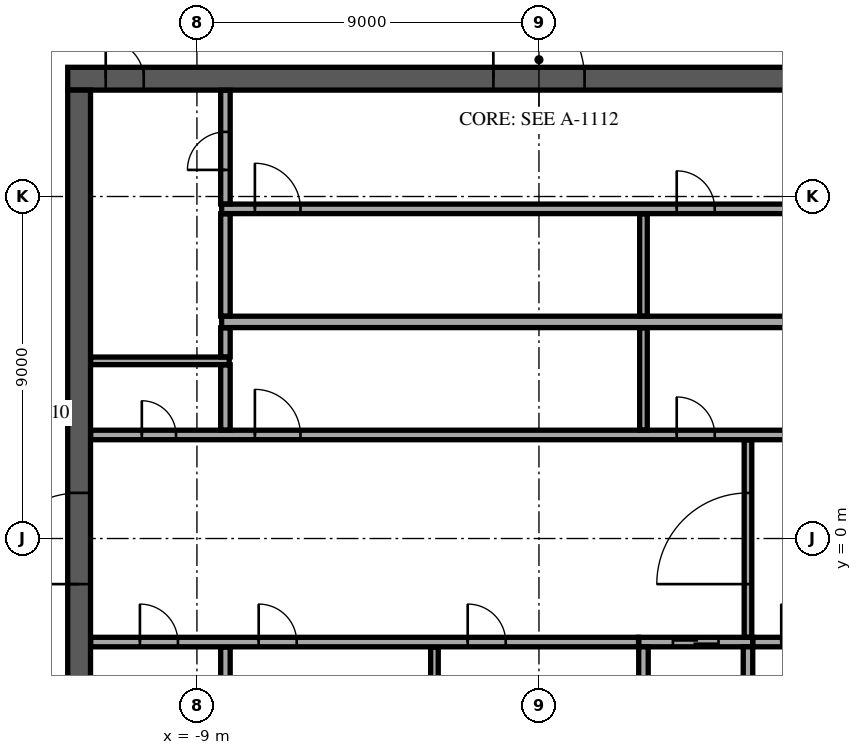
"""IFC4 building model, lengths in metres.
Left out: names, types, materials, properties, quantities, classifications, styles, units other than length and angle.
Written with IfcOpenShell. Run it as: python <this file> out.ifc"""

import sys

from ifc_helpers import new_model, si_unit, direction, frame, frame_2d, origin, place, context, subcontext, project, spatial, rectangle, extrude, element, fill, save


model = new_model("IFC4")
c1 = context("Model", 3, precision=1e-05, world=origin(), true_north=direction((0.0, 1.0)))
c2 = subcontext(c1, "Body", "Model", "MODEL_VIEW")
j1 = project(units=[si_unit("LENGTHUNIT", "METRE"), si_unit("PLANEANGLEUNIT", "RADIAN")], contexts=[c1])
p1 = place(None, origin())
s1 = spatial("IfcSite", under=j1, at=p1, CompositionType="ELEMENT")
p2 = place(p1, origin())
s2 = spatial("IfcBuilding", under=s1, at=p2, CompositionType="ELEMENT")
p3 = place(p2, frame((0.0, 0.0, 368.1)))
s3 = spatial("IfcBuildingStorey", under=s2, at=p3, CompositionType="ELEMENT", Elevation=368.1)
p4 = place(p3, frame((-12.4, 12.1, 0.0), z_axis=(0.0, 0.0, 1.0), x_axis=(1.0, 0.0, 0.0)))
e1 = element("IfcWall", 1, at=p4, inside=s3, PredefinedType="SHEAR", context=c2, shape_type="SweptSolid", body=[
    extrude(rectangle(XDim=24.8, YDim=0.6, at=frame_2d((12.4, 0.0))), origin(), (0.0, 0.0, 1.0), 4.7),
])
p5 = place(p4, frame((11.2, 0.0, 0.0)))
e2 = element("IfcOpeningElement", 2, at=p5, cuts=e1, PredefinedType="OPENING", context=c2, shape_type="SweptSolid", body=[
    extrude(rectangle(XDim=2.4, YDim=2.4, at=frame_2d((1.2, 1.2))), frame((0.0, 0.31, 0.0), z_axis=(0.0, -1.0, 0.0), x_axis=(1.0, 0.0, 0.0)), (0.0, 0.0, 1.0), 0.62),
])
p6 = place(p4, frame((22.025, 0.0, 0.0)))
e3 = element("IfcOpeningElement", 3, at=p6, cuts=e1, PredefinedType="OPENING", context=c2, shape_type="SweptSolid", body=[
    extrude(rectangle(XDim=1.2, YDim=2.1, at=frame_2d((0.6, 1.05))), frame((0.0, 0.31, 0.0), z_axis=(0.0, -1.0, 0.0), x_axis=(1.0, 0.0, 0.0)), (0.0, 0.0, 1.0), 0.62),
])
p7 = place(p4, frame((1.0, 0.0, 0.0)))
e4 = element("IfcOpeningElement", 4, at=p7, cuts=e1, PredefinedType="OPENING", context=c2, shape_type="SweptSolid", body=[
    extrude(rectangle(XDim=1.0, YDim=2.1, at=frame_2d((0.5, 1.05))), frame((0.0, 0.31, 0.0), z_axis=(0.0, -1.0, 0.0), x_axis=(1.0, 0.0, 0.0)), (0.0, 0.0, 1.0), 0.62),
])
p8 = place(p3, frame((-12.1, -11.8, 0.0), z_axis=(0.0, 0.0, 1.0), x_axis=(0.0, 1.0, 0.0)))
e5 = element("IfcWall", 5, at=p8, inside=s3, PredefinedType="SHEAR", context=c2, shape_type="SweptSolid", body=[
    extrude(rectangle(XDim=23.6, YDim=0.6, at=frame_2d((11.8, 0.0))), origin(), (0.0, 0.0, 1.0), 4.7),
])
p9 = place(p8, frame((10.6, 0.0, 0.0)))
e6 = element("IfcOpeningElement", 6, at=p9, cuts=e5, PredefinedType="OPENING", context=c2, shape_type="SweptSolid", body=[
    extrude(rectangle(XDim=2.4, YDim=2.4, at=frame_2d((1.2, 1.2))), frame((0.0, 0.31, 0.0), z_axis=(0.0, -1.0, 0.0), x_axis=(1.0, 0.0, 0.0)), (0.0, 0.0, 1.0), 0.62),
])
p10 = place(p3, frame((2.625, -2.725, 0.0), z_axis=(0.0, 0.0, 1.0), x_axis=(1.0, 0.0, 0.0)))
e7 = element("IfcWall", 7, at=p10, inside=s3, PredefinedType="SOLIDWALL", context=c2, shape_type="SweptSolid", body=[
    extrude(rectangle(XDim=3.0, YDim=0.25, at=frame_2d((1.5, 0.0))), origin(), (0.0, 0.0, 1.0), 4.7),
])
p11 = place(p10, frame((0.9, 0.0, 0.0)))
e8 = element("IfcOpeningElement", 8, at=p11, cuts=e7, PredefinedType="OPENING", context=c2, shape_type="SweptSolid", body=[
    extrude(rectangle(XDim=1.2, YDim=2.1, at=frame_2d((0.6, 1.05))), frame((0.0, 0.135, 0.0), z_axis=(0.0, -1.0, 0.0), x_axis=(1.0, 0.0, 0.0)), (0.0, 0.0, 1.0), 0.27),
])
for number, where, z_axis, x_axis in (
    (9, (2.75, -5.55, 0.0), (0.0, 0.0, 1.0), (0.0, 1.0, 0.0)),
    (10, (5.5, -5.55, 0.0), (0.0, 0.0, 1.0), (0.0, 1.0, 0.0)),
):
    element("IfcWall", number, at=place(p3, frame(where, z_axis=z_axis, x_axis=x_axis)), inside=s3, PredefinedType="SOLIDWALL", context=c2, shape_type="SweptSolid", body=[
        extrude(rectangle(XDim=2.7, YDim=0.25, at=frame_2d((1.35, 0.0))), origin(), (0.0, 0.0, 1.0), 4.7),
    ])
p12 = place(p3, frame((-8.25, -5.545, 0.0), z_axis=(0.0, 0.0, 1.0), x_axis=(0.0, 1.0, 0.0)))
e11 = element("IfcWall", 11, at=p12, inside=s3, PredefinedType="PARTITIONING", context=c2, shape_type="SweptSolid", body=[
    extrude(rectangle(XDim=2.69, YDim=0.25, at=frame_2d((1.345, 0.0))), origin(), (0.0, 0.0, 1.0), 4.7),
])
p13 = place(p3, frame((-2.75, -5.545, 0.0), z_axis=(0.0, 0.0, 1.0), x_axis=(0.0, 1.0, 0.0)))
e12 = element("IfcWall", 12, at=p13, inside=s3, PredefinedType="PARTITIONING", context=c2, shape_type="SweptSolid", body=[
    extrude(rectangle(XDim=2.69, YDim=0.2, at=frame_2d((1.345, 0.0))), origin(), (0.0, 0.0, 1.0), 4.7),
])
p14 = place(p3, frame((-11.795, -2.725, 0.0), z_axis=(0.0, 0.0, 1.0), x_axis=(1.0, 0.0, 0.0)))
e13 = element("IfcWall", 13, at=p14, inside=s3, PredefinedType="PARTITIONING", context=c2, shape_type="SweptSolid", body=[
    extrude(rectangle(XDim=14.415, YDim=0.25, at=frame_2d((7.208, 0.0))), origin(), (0.0, 0.0, 1.0), 4.7),
])
p15 = place(p14, frame((1.295, 0.0, 0.0)))
e14 = element("IfcOpeningElement", 14, at=p15, cuts=e13, PredefinedType="OPENING", context=c2, shape_type="SweptSolid", body=[
    extrude(rectangle(XDim=1.0, YDim=2.1, at=frame_2d((0.5, 1.05))), frame((0.0, 0.135, 0.0), z_axis=(0.0, -1.0, 0.0), x_axis=(1.0, 0.0, 0.0)), (0.0, 0.0, 1.0), 0.27),
])
p16 = place(p14, frame((4.42, 0.0, 0.0)))
e15 = element("IfcOpeningElement", 15, at=p16, cuts=e13, PredefinedType="OPENING", context=c2, shape_type="SweptSolid", body=[
    extrude(rectangle(XDim=1.0, YDim=2.1, at=frame_2d((0.5, 1.05))), frame((0.0, 0.135, 0.0), z_axis=(0.0, -1.0, 0.0), x_axis=(1.0, 0.0, 0.0)), (0.0, 0.0, 1.0), 0.27),
])
p17 = place(p14, frame((9.92, 0.0, 0.0)))
e16 = element("IfcOpeningElement", 16, at=p17, cuts=e13, PredefinedType="OPENING", context=c2, shape_type="SweptSolid", body=[
    extrude(rectangle(XDim=1.0, YDim=2.1, at=frame_2d((0.5, 1.05))), frame((0.0, 0.135, 0.0), z_axis=(0.0, -1.0, 0.0), x_axis=(1.0, 0.0, 0.0)), (0.0, 0.0, 1.0), 0.27),
])
p18 = place(p3, frame((5.63, -2.725, 0.0), z_axis=(0.0, 0.0, 1.0), x_axis=(1.0, 0.0, 0.0)))
e17 = element("IfcWall", 17, at=p18, inside=s3, PredefinedType="PARTITIONING", context=c2, shape_type="SweptSolid", body=[
    extrude(rectangle(XDim=6.165, YDim=0.25, at=frame_2d((3.083, 0.0))), origin(), (0.0, 0.0, 1.0), 4.7),
])
p19 = place(p18, frame((0.745, 0.0, 0.0)))
e18 = element("IfcOpeningElement", 18, at=p19, cuts=e17, PredefinedType="OPENING", context=c2, shape_type="SweptSolid", body=[
    extrude(rectangle(XDim=1.0, YDim=2.1, at=frame_2d((0.5, 1.05))), frame((0.0, 0.135, 0.0), z_axis=(0.0, -1.0, 0.0), x_axis=(1.0, 0.0, 0.0)), (0.0, 0.0, 1.0), 0.27),
])
p20 = place(p18, frame((3.92, 0.0, 0.0)))
e19 = element("IfcOpeningElement", 19, at=p20, cuts=e17, PredefinedType="OPENING", context=c2, shape_type="SweptSolid", body=[
    extrude(rectangle(XDim=0.9, YDim=2.1, at=frame_2d((0.45, 1.05))), frame((0.0, 0.135, 0.0), z_axis=(0.0, -1.0, 0.0), x_axis=(1.0, 0.0, 0.0)), (0.0, 0.0, 1.0), 0.27),
])
p21 = place(p3, frame((5.5, -2.595, 0.0), z_axis=(0.0, 0.0, 1.0), x_axis=(0.0, 1.0, 0.0)))
e20 = element("IfcWall", 20, at=p21, inside=s3, PredefinedType="PARTITIONING", context=c2, shape_type="SweptSolid", body=[
    extrude(rectangle(XDim=5.19, YDim=0.2, at=frame_2d((2.595, 0.0))), origin(), (0.0, 0.0, 1.0), 4.7),
])
p22 = place(p21, frame((1.395, 0.0, 0.0)))
e21 = element("IfcOpeningElement", 21, at=p22, cuts=e20, PredefinedType="OPENING", context=c2, shape_type="SweptSolid", body=[
    extrude(rectangle(XDim=2.4, YDim=2.4, at=frame_2d((1.2, 1.2))), frame((0.0, 0.11, 0.0), z_axis=(0.0, -1.0, 0.0), x_axis=(1.0, 0.0, 0.0)), (0.0, 0.0, 1.0), 0.22),
])
p23 = place(p3, frame((-11.795, 2.725, 0.0), z_axis=(0.0, 0.0, 1.0), x_axis=(1.0, 0.0, 0.0)))
e22 = element("IfcWall", 22, at=p23, inside=s3, PredefinedType="PARTITIONING", context=c2, shape_type="SweptSolid", body=[
    extrude(rectangle(XDim=23.59, YDim=0.25, at=frame_2d((11.795, 0.0))), origin(), (0.0, 0.0, 1.0), 4.7),
])
p24 = place(p23, frame((21.345, 0.0, 0.0)))
e23 = element("IfcOpeningElement", 23, at=p24, cuts=e22, PredefinedType="OPENING", context=c2, shape_type="SweptSolid", body=[
    extrude(rectangle(XDim=0.9, YDim=2.1, at=frame_2d((0.45, 1.05))), frame((0.0, 0.135, 0.0), z_axis=(0.0, -1.0, 0.0), x_axis=(1.0, 0.0, 0.0)), (0.0, 0.0, 1.0), 0.27),
])
p25 = place(p23, frame((1.345, 0.0, 0.0)))
e24 = element("IfcOpeningElement", 24, at=p25, cuts=e22, PredefinedType="OPENING", context=c2, shape_type="SweptSolid", body=[
    extrude(rectangle(XDim=0.9, YDim=2.1, at=frame_2d((0.45, 1.05))), frame((0.0, 0.135, 0.0), z_axis=(0.0, -1.0, 0.0), x_axis=(1.0, 0.0, 0.0)), (0.0, 0.0, 1.0), 0.27),
])
p26 = place(p23, frame((4.32, 0.0, 0.0)))
e25 = element("IfcOpeningElement", 25, at=p26, cuts=e22, PredefinedType="OPENING", context=c2, shape_type="SweptSolid", body=[
    extrude(rectangle(XDim=1.2, YDim=2.1, at=frame_2d((0.6, 1.05))), frame((0.0, 0.135, 0.0), z_axis=(0.0, -1.0, 0.0), x_axis=(1.0, 0.0, 0.0)), (0.0, 0.0, 1.0), 0.27),
])
p27 = place(p23, frame((15.42, 0.0, 0.0)))
e26 = element("IfcOpeningElement", 26, at=p27, cuts=e22, PredefinedType="OPENING", context=c2, shape_type="SweptSolid", body=[
    extrude(rectangle(XDim=1.0, YDim=2.1, at=frame_2d((0.5, 1.05))), frame((0.0, 0.135, 0.0), z_axis=(0.0, -1.0, 0.0), x_axis=(1.0, 0.0, 0.0)), (0.0, 0.0, 1.0), 0.27),
])
p28 = place(p3, frame((-8.25, 2.855, 0.0), z_axis=(0.0, 0.0, 1.0), x_axis=(0.0, 1.0, 0.0)))
e27 = element("IfcWall", 27, at=p28, inside=s3, PredefinedType="PARTITIONING", context=c2, shape_type="SweptSolid", body=[
    extrude(rectangle(XDim=1.715, YDim=0.25, at=frame_2d((0.857, 0.0))), origin(), (0.0, 0.0, 1.0), 4.7),
])
p29 = place(p3, frame((2.75, 2.855, 0.0), z_axis=(0.0, 0.0, 1.0), x_axis=(0.0, 1.0, 0.0)))
e28 = element("IfcWall", 28, at=p29, inside=s3, PredefinedType="PARTITIONING", context=c2, shape_type="SweptSolid", body=[
    extrude(rectangle(XDim=2.69, YDim=0.2, at=frame_2d((1.345, 0.0))), origin(), (0.0, 0.0, 1.0), 4.7),
])
p30 = place(p3, frame((-11.795, 4.675, 0.0), z_axis=(0.0, 0.0, 1.0), x_axis=(1.0, 0.0, 0.0)))
e29 = element("IfcWall", 29, at=p30, inside=s3, PredefinedType="PARTITIONING", context=c2, shape_type="SweptSolid", body=[
    extrude(rectangle(XDim=3.645, YDim=0.2, at=frame_2d((1.823, 0.0))), origin(), (0.0, 0.0, 1.0), 4.7),
])
p31 = place(p3, frame((-8.25, 4.78, 0.0), z_axis=(0.0, 0.0, 1.0), x_axis=(0.0, 1.0, 0.0)))
e30 = element("IfcWall", 30, at=p31, inside=s3, PredefinedType="PARTITIONING", context=c2, shape_type="SweptSolid", body=[
    extrude(rectangle(XDim=0.765, YDim=0.25, at=frame_2d((0.382, 0.0))), origin(), (0.0, 0.0, 1.0), 4.7),
])
p32 = place(p3, frame((-8.35, 5.7, 0.0), z_axis=(0.0, 0.0, 1.0), x_axis=(1.0, 0.0, 0.0)))
e31 = element("IfcWall", 31, at=p32, inside=s3, PredefinedType="PARTITIONING", context=c2, shape_type="SweptSolid", body=[
    extrude(rectangle(XDim=16.7, YDim=0.3, at=frame_2d((8.35, 0.0))), origin(), (0.0, 0.0, 1.0), 4.7),
])
p33 = place(p3, frame((-8.25, 5.855, 0.0), z_axis=(0.0, 0.0, 1.0), x_axis=(0.0, 1.0, 0.0)))
e32 = element("IfcWall", 32, at=p33, inside=s3, PredefinedType="PARTITIONING", context=c2, shape_type="SweptSolid", body=[
    extrude(rectangle(XDim=2.69, YDim=0.25, at=frame_2d((1.345, 0.0))), origin(), (0.0, 0.0, 1.0), 4.7),
])
p34 = place(p3, frame((2.75, 5.855, 0.0), z_axis=(0.0, 0.0, 1.0), x_axis=(0.0, 1.0, 0.0)))
e33 = element("IfcWall", 33, at=p34, inside=s3, PredefinedType="PARTITIONING", context=c2, shape_type="SweptSolid", body=[
    extrude(rectangle(XDim=2.69, YDim=0.2, at=frame_2d((1.345, 0.0))), origin(), (0.0, 0.0, 1.0), 4.7),
])
p35 = place(p3, frame((-8.35, 8.675, 0.0), z_axis=(0.0, 0.0, 1.0), x_axis=(1.0, 0.0, 0.0)))
e34 = element("IfcWall", 34, at=p35, inside=s3, PredefinedType="PARTITIONING", context=c2, shape_type="SweptSolid", body=[
    extrude(rectangle(XDim=16.72, YDim=0.25, at=frame_2d((8.36, 0.0))), origin(), (0.0, 0.0, 1.0), 4.7),
])
p36 = place(p35, frame((0.875, 0.0, 0.0)))
e35 = element("IfcOpeningElement", 35, at=p36, cuts=e34, PredefinedType="OPENING", context=c2, shape_type="SweptSolid", body=[
    extrude(rectangle(XDim=1.2, YDim=2.1, at=frame_2d((0.6, 1.05))), frame((0.0, 0.135, 0.0), z_axis=(0.0, -1.0, 0.0), x_axis=(1.0, 0.0, 0.0)), (0.0, 0.0, 1.0), 0.27),
])
p37 = place(p35, frame((11.975, 0.0, 0.0)))
e36 = element("IfcOpeningElement", 36, at=p37, cuts=e34, PredefinedType="OPENING", context=c2, shape_type="SweptSolid", body=[
    extrude(rectangle(XDim=1.0, YDim=2.1, at=frame_2d((0.5, 1.05))), frame((0.0, 0.135, 0.0), z_axis=(0.0, -1.0, 0.0), x_axis=(1.0, 0.0, 0.0)), (0.0, 0.0, 1.0), 0.27),
])
p38 = place(p3, frame((-8.25, 8.805, 0.0), z_axis=(0.0, 0.0, 1.0), x_axis=(0.0, 1.0, 0.0)))
e37 = element("IfcWall", 37, at=p38, inside=s3, PredefinedType="PARTITIONING", context=c2, shape_type="SweptSolid", body=[
    extrude(rectangle(XDim=2.99, YDim=0.25, at=frame_2d((1.495, 0.0))), origin(), (0.0, 0.0, 1.0), 4.7),
])
p39 = place(p38, frame((0.895, 0.0, 0.0)))
e38 = element("IfcOpeningElement", 38, at=p39, cuts=e37, PredefinedType="OPENING", context=c2, shape_type="SweptSolid", body=[
    extrude(rectangle(XDim=1.0, YDim=2.1, at=frame_2d((0.5, 1.05))), frame((0.0, 0.135, 0.0), z_axis=(0.0, -1.0, 0.0), x_axis=(1.0, 0.0, 0.0)), (0.0, 0.0, 1.0), 0.27),
])
p40 = place(p5, origin())
e39 = element("IfcDoor", 39, at=p40, inside=s3, OperationType="SINGLE_SWING_LEFT", PredefinedType="DOOR", context=c2, shape_type="SweptSolid", body=[
    extrude(rectangle(XDim=2.4, YDim=2.4, at=frame_2d((1.2, 1.2))), frame((0.0, 0.025, 0.0), z_axis=(0.0, -1.0, 0.0), x_axis=(1.0, 0.0, 0.0)), (0.0, 0.0, 1.0), 0.05),
])
fill(e2, e39)
p41 = place(p7, origin())
e40 = element("IfcDoor", 40, at=p41, inside=s3, OperationType="SINGLE_SWING_LEFT", PredefinedType="DOOR", context=c2, shape_type="SweptSolid", body=[
    extrude(rectangle(XDim=1.0, YDim=2.1, at=frame_2d((0.5, 1.05))), frame((0.0, 0.025, 0.0), z_axis=(0.0, -1.0, 0.0), x_axis=(1.0, 0.0, 0.0)), (0.0, 0.0, 1.0), 0.05),
])
fill(e4, e40)
p42 = place(p9, origin())
e41 = element("IfcDoor", 41, at=p42, inside=s3, OperationType="SINGLE_SWING_LEFT", PredefinedType="DOOR", context=c2, shape_type="SweptSolid", body=[
    extrude(rectangle(XDim=2.4, YDim=2.4, at=frame_2d((1.2, 1.2))), frame((0.0, 0.025, 0.0), z_axis=(0.0, -1.0, 0.0), x_axis=(1.0, 0.0, 0.0)), (0.0, 0.0, 1.0), 0.05),
])
fill(e6, e41)
p43 = place(p11, origin())
e42 = element("IfcDoor", 42, at=p43, inside=s3, OperationType="DOUBLE_DOOR_SLIDING", PredefinedType="DOOR", context=c2, shape_type="SweptSolid", body=[
    extrude(rectangle(XDim=1.2, YDim=2.1, at=frame_2d((0.6, 1.05))), frame((0.0, 0.025, 0.0), z_axis=(0.0, -1.0, 0.0), x_axis=(1.0, 0.0, 0.0)), (0.0, 0.0, 1.0), 0.05),
])
fill(e8, e42)
p44 = place(p15, origin())
e43 = element("IfcDoor", 43, at=p44, inside=s3, OperationType="SINGLE_SWING_LEFT", PredefinedType="DOOR", context=c2, shape_type="SweptSolid", body=[
    extrude(rectangle(XDim=1.0, YDim=2.1, at=frame_2d((0.5, 1.05))), frame((0.0, 0.025, 0.0), z_axis=(0.0, -1.0, 0.0), x_axis=(1.0, 0.0, 0.0)), (0.0, 0.0, 1.0), 0.05),
])
fill(e14, e43)
p45 = place(p19, origin())
e44 = element("IfcDoor", 44, at=p45, inside=s3, OperationType="SINGLE_SWING_LEFT", PredefinedType="DOOR", context=c2, shape_type="SweptSolid", body=[
    extrude(rectangle(XDim=1.0, YDim=2.1, at=frame_2d((0.5, 1.05))), frame((0.0, 0.025, 0.0), z_axis=(0.0, -1.0, 0.0), x_axis=(1.0, 0.0, 0.0)), (0.0, 0.0, 1.0), 0.05),
])
fill(e18, e44)
p46 = place(p25, origin())
e45 = element("IfcDoor", 45, at=p46, inside=s3, OperationType="SINGLE_SWING_LEFT", PredefinedType="DOOR", context=c2, shape_type="SweptSolid", body=[
    extrude(rectangle(XDim=0.9, YDim=2.1, at=frame_2d((0.45, 1.05))), frame((0.0, 0.025, 0.0), z_axis=(0.0, -1.0, 0.0), x_axis=(1.0, 0.0, 0.0)), (0.0, 0.0, 1.0), 0.05),
])
fill(e24, e45)
p47 = place(p39, origin())
e46 = element("IfcDoor", 46, at=p47, inside=s3, OperationType="SINGLE_SWING_LEFT", PredefinedType="DOOR", context=c2, shape_type="SweptSolid", body=[
    extrude(rectangle(XDim=1.0, YDim=2.1, at=frame_2d((0.5, 1.05))), frame((0.0, 0.025, 0.0), z_axis=(0.0, -1.0, 0.0), x_axis=(1.0, 0.0, 0.0)), (0.0, 0.0, 1.0), 0.05),
])
fill(e38, e46)
p48 = place(p26, origin())
e47 = element("IfcDoor", 47, at=p48, inside=s3, OperationType="SINGLE_SWING_LEFT", PredefinedType="DOOR", context=c2, shape_type="SweptSolid", body=[
    extrude(rectangle(XDim=1.2, YDim=2.1, at=frame_2d((0.6, 1.05))), frame((0.0, 0.025, 0.0), z_axis=(0.0, -1.0, 0.0), x_axis=(1.0, 0.0, 0.0)), (0.0, 0.0, 1.0), 0.05),
])
fill(e25, e47)
p49 = place(p27, origin())
e48 = element("IfcDoor", 48, at=p49, inside=s3, OperationType="SINGLE_SWING_LEFT", PredefinedType="DOOR", context=c2, shape_type="SweptSolid", body=[
    extrude(rectangle(XDim=1.0, YDim=2.1, at=frame_2d((0.5, 1.05))), frame((0.0, 0.025, 0.0), z_axis=(0.0, -1.0, 0.0), x_axis=(1.0, 0.0, 0.0)), (0.0, 0.0, 1.0), 0.05),
])
fill(e26, e48)
p50 = place(p36, origin())
e49 = element("IfcDoor", 49, at=p50, inside=s3, OperationType="SINGLE_SWING_LEFT", PredefinedType="DOOR", context=c2, shape_type="SweptSolid", body=[
    extrude(rectangle(XDim=1.2, YDim=2.1, at=frame_2d((0.6, 1.05))), frame((0.0, 0.025, 0.0), z_axis=(0.0, -1.0, 0.0), x_axis=(1.0, 0.0, 0.0)), (0.0, 0.0, 1.0), 0.05),
])
fill(e35, e49)
p51 = place(p37, origin())
e50 = element("IfcDoor", 50, at=p51, inside=s3, OperationType="SINGLE_SWING_LEFT", PredefinedType="DOOR", context=c2, shape_type="SweptSolid", body=[
    extrude(rectangle(XDim=1.0, YDim=2.1, at=frame_2d((0.5, 1.05))), frame((0.0, 0.025, 0.0), z_axis=(0.0, -1.0, 0.0), x_axis=(1.0, 0.0, 0.0)), (0.0, 0.0, 1.0), 0.05),
])
fill(e36, e50)
p52 = place(p16, origin())
e51 = element("IfcDoor", 51, at=p52, inside=s3, OperationType="SINGLE_SWING_LEFT", PredefinedType="DOOR", context=c2, shape_type="SweptSolid", body=[
    extrude(rectangle(XDim=1.0, YDim=2.1, at=frame_2d((0.5, 1.05))), frame((0.0, 0.025, 0.0), z_axis=(0.0, -1.0, 0.0), x_axis=(1.0, 0.0, 0.0)), (0.0, 0.0, 1.0), 0.05),
])
fill(e15, e51)
p53 = place(p17, origin())
e52 = element("IfcDoor", 52, at=p53, inside=s3, OperationType="SINGLE_SWING_LEFT", PredefinedType="DOOR", context=c2, shape_type="SweptSolid", body=[
    extrude(rectangle(XDim=1.0, YDim=2.1, at=frame_2d((0.5, 1.05))), frame((0.0, 0.025, 0.0), z_axis=(0.0, -1.0, 0.0), x_axis=(1.0, 0.0, 0.0)), (0.0, 0.0, 1.0), 0.05),
])
fill(e16, e52)
p54 = place(p22, origin())
e53 = element("IfcDoor", 53, at=p54, inside=s3, OperationType="SINGLE_SWING_LEFT", PredefinedType="DOOR", context=c2, shape_type="SweptSolid", body=[
    extrude(rectangle(XDim=2.4, YDim=2.4, at=frame_2d((1.2, 1.2))), frame((0.0, 0.025, 0.0), z_axis=(0.0, -1.0, 0.0), x_axis=(1.0, 0.0, 0.0)), (0.0, 0.0, 1.0), 0.05),
])
fill(e21, e53)
save(model, sys.argv[1])
